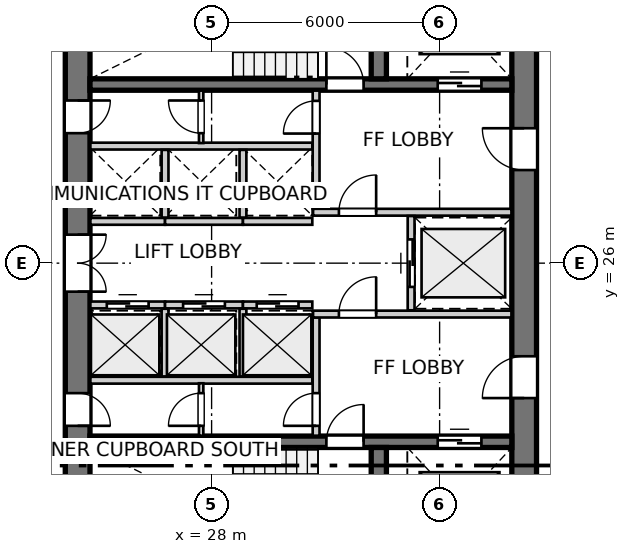
"""IFC4 building model, lengths in metres.
Left out: names, types, materials, properties, quantities, classifications, styles, units other than length and angle.
Written with IfcOpenShell. Run it as: python <this file> out.ifc"""

import sys

from ifc_helpers import new_model, si_unit, direction, frame, frame_2d, origin, place, context, subcontext, project, spatial, rectangle, extrude, source, transform, mapped, element, fill, save


model = new_model("IFC4")
c1 = context("Model", 3, precision=1e-05, world=origin(), true_north=direction((0.0, 1.0)))
c2 = subcontext(c1, "Body", "Model", "MODEL_VIEW")
j1 = project(units=[si_unit("LENGTHUNIT", "METRE"), si_unit("PLANEANGLEUNIT", "RADIAN")], contexts=[c1])
p1 = place(None, origin())
s1 = spatial("IfcSite", under=j1, at=p1, CompositionType="ELEMENT")
p2 = place(p1, origin())
s2 = spatial("IfcBuilding", under=s1, at=p2, CompositionType="ELEMENT")
p3 = place(p2, frame((0.0, 0.0, 115.2)))
s3 = spatial("IfcBuildingStorey", under=s2, at=p3, CompositionType="ELEMENT", Elevation=115.2)
p4 = place(p3, frame((24.475, 33.8, 0.0), z_axis=(0.0, 0.0, 1.0), x_axis=(0.0, -1.0, 0.0)))
e1 = element("IfcWall", 1, at=p4, inside=s3, PredefinedType="SHEAR", context=c2, shape_type="SweptSolid", body=[
    extrude(rectangle(XDim=15.6, YDim=0.65, at=frame_2d((7.8, 0.0))), origin(), (0.0, 0.0, 1.0), 2.95),
])
p5 = place(p4, frame((7.05, 0.0, 0.0)))
e2 = element("IfcOpeningElement", 2, at=p5, cuts=e1, PredefinedType="OPENING", context=c2, shape_type="SweptSolid", body=[
    extrude(rectangle(XDim=1.5, YDim=2.15, at=frame_2d((0.75, 1.075))), frame((0.0, 0.335, 0.0), z_axis=(0.0, -1.0, 0.0), x_axis=(1.0, 0.0, 0.0)), (0.0, 0.0, 1.0), 0.67),
])
p6 = place(p4, frame((3.52, 0.0, 0.0)))
e3 = element("IfcOpeningElement", 3, at=p6, cuts=e1, PredefinedType="OPENING", context=c2, shape_type="SweptSolid", body=[
    extrude(rectangle(XDim=0.86, YDim=2.05, at=frame_2d((0.43, 1.025))), frame((0.0, 0.335, 0.0), z_axis=(0.0, -1.0, 0.0), x_axis=(1.0, 0.0, 0.0)), (0.0, 0.0, 1.0), 0.67),
])
p7 = place(p4, frame((11.22, 0.0, 0.0)))
e4 = element("IfcOpeningElement", 4, at=p7, cuts=e1, PredefinedType="OPENING", context=c2, shape_type="SweptSolid", body=[
    extrude(rectangle(XDim=0.86, YDim=2.05, at=frame_2d((0.43, 1.025))), frame((0.0, 0.335, 0.0), z_axis=(0.0, -1.0, 0.0), x_axis=(1.0, 0.0, 0.0)), (0.0, 0.0, 1.0), 0.67),
])
p8 = place(p3, frame((36.225, 18.2, 0.0), z_axis=(0.0, 0.0, 1.0), x_axis=(0.0, 1.0, 0.0)))
e5 = element("IfcWall", 5, at=p8, inside=s3, PredefinedType="SHEAR", context=c2, shape_type="SweptSolid", body=[
    extrude(rectangle(XDim=15.6, YDim=0.65, at=frame_2d((7.8, 0.0))), origin(), (0.0, 0.0, 1.0), 2.95),
])
p9 = place(p8, frame((4.25, 0.0, 0.0)))
e6 = element("IfcOpeningElement", 6, at=p9, cuts=e5, PredefinedType="OPENING", context=c2, shape_type="SweptSolid", body=[
    extrude(rectangle(XDim=1.1, YDim=2.15, at=frame_2d((0.55, 1.075))), frame((0.0, 0.335, 0.0), z_axis=(0.0, -1.0, 0.0), x_axis=(1.0, 0.0, 0.0)), (0.0, 0.0, 1.0), 0.67),
])
p10 = place(p8, frame((10.25, 0.0, 0.0)))
e7 = element("IfcOpeningElement", 7, at=p10, cuts=e5, PredefinedType="OPENING", context=c2, shape_type="SweptSolid", body=[
    extrude(rectangle(XDim=1.1, YDim=2.15, at=frame_2d((0.55, 1.075))), frame((0.0, 0.335, 0.0), z_axis=(0.0, -1.0, 0.0), x_axis=(1.0, 0.0, 0.0)), (0.0, 0.0, 1.0), 0.67),
])
p11 = place(p3, frame((24.8, 21.3, 0.0), z_axis=(0.0, 0.0, 1.0), x_axis=(1.0, 0.0, 0.0)))
e8 = element("IfcWall", 8, at=p11, inside=s3, PredefinedType="SHEAR", context=c2, shape_type="SweptSolid", body=[
    extrude(rectangle(XDim=11.1, YDim=0.3, at=frame_2d((5.55, 0.0))), origin(), (0.0, 0.0, 1.0), 2.95),
])
p12 = place(p11, frame((6.22, 0.0, 0.0)))
e9 = element("IfcOpeningElement", 9, at=p12, cuts=e8, PredefinedType="OPENING", context=c2, shape_type="SweptSolid", body=[
    extrude(rectangle(XDim=0.98, YDim=2.15, at=frame_2d((0.49, 1.075))), frame((0.0, 0.16, 0.0), z_axis=(0.0, -1.0, 0.0), x_axis=(1.0, 0.0, 0.0)), (0.0, 0.0, 1.0), 0.32),
])
p13 = place(p11, frame((9.15, 0.0, 0.0)))
e10 = element("IfcOpeningElement", 10, at=p13, cuts=e8, PredefinedType="OPENING", context=c2, shape_type="SweptSolid", body=[
    extrude(rectangle(XDim=1.15, YDim=2.15, at=frame_2d((0.575, 1.075))), frame((0.0, 0.16, 0.0), z_axis=(0.0, -1.0, 0.0), x_axis=(1.0, 0.0, 0.0)), (0.0, 0.0, 1.0), 0.32),
])
p14 = place(p3, frame((32.4, 18.2, 0.0), z_axis=(0.0, 0.0, 1.0), x_axis=(0.0, 1.0, 0.0)))
e11 = element("IfcWall", 11, at=p14, inside=s3, PredefinedType="SHEAR", context=c2, shape_type="SweptSolid", body=[
    extrude(rectangle(XDim=2.95, YDim=0.4, at=frame_2d((1.475, 0.0))), origin(), (0.0, 0.0, 1.0), 2.95),
])
p15 = place(p3, frame((24.8, 30.7, 0.0), z_axis=(0.0, 0.0, 1.0), x_axis=(1.0, 0.0, 0.0)))
e12 = element("IfcWall", 12, at=p15, inside=s3, PredefinedType="SHEAR", context=c2, shape_type="SweptSolid", body=[
    extrude(rectangle(XDim=11.1, YDim=0.3, at=frame_2d((5.55, 0.0))), origin(), (0.0, 0.0, 1.0), 2.95),
])
p16 = place(p15, frame((6.22, 0.0, 0.0)))
e13 = element("IfcOpeningElement", 13, at=p16, cuts=e12, PredefinedType="OPENING", context=c2, shape_type="SweptSolid", body=[
    extrude(rectangle(XDim=0.98, YDim=2.15, at=frame_2d((0.49, 1.075))), frame((0.0, 0.16, 0.0), z_axis=(0.0, -1.0, 0.0), x_axis=(1.0, 0.0, 0.0)), (0.0, 0.0, 1.0), 0.32),
])
p17 = place(p15, frame((9.15, 0.0, 0.0)))
e14 = element("IfcOpeningElement", 14, at=p17, cuts=e12, PredefinedType="OPENING", context=c2, shape_type="SweptSolid", body=[
    extrude(rectangle(XDim=1.15, YDim=2.15, at=frame_2d((0.575, 1.075))), frame((0.0, 0.16, 0.0), z_axis=(0.0, -1.0, 0.0), x_axis=(1.0, 0.0, 0.0)), (0.0, 0.0, 1.0), 0.32),
])
p18 = place(p3, frame((32.4, 30.85, 0.0), z_axis=(0.0, 0.0, 1.0), x_axis=(0.0, 1.0, 0.0)))
e15 = element("IfcWall", 15, at=p18, inside=s3, PredefinedType="SHEAR", context=c2, shape_type="SweptSolid", body=[
    extrude(rectangle(XDim=2.95, YDim=0.4, at=frame_2d((1.475, 0.0))), origin(), (0.0, 0.0, 1.0), 2.95),
])
p19 = place(p3, frame((30.75, 21.46, 0.0), z_axis=(0.0, 0.0, 1.0), x_axis=(0.0, 1.0, 0.0)))
e16 = element("IfcWall", 16, at=p19, inside=s3, PredefinedType="PARTITIONING", context=c2, shape_type="SweptSolid", body=[
    extrude(rectangle(XDim=3.11, YDim=0.18, at=frame_2d((1.555, 0.0))), origin(), (0.0, 0.0, 1.0), 2.95),
])
p20 = place(p19, frame((0.26, 0.0, 0.0)))
e17 = element("IfcOpeningElement", 17, at=p20, cuts=e16, PredefinedType="OPENING", context=c2, shape_type="SweptSolid", body=[
    extrude(rectangle(XDim=0.86, YDim=2.05, at=frame_2d((0.43, 1.025))), frame((0.0, 0.1, 0.0), z_axis=(0.0, -1.0, 0.0), x_axis=(1.0, 0.0, 0.0)), (0.0, 0.0, 1.0), 0.2),
])
p21 = place(p3, frame((30.67, 24.66, 0.0), z_axis=(0.0, 0.0, 1.0), x_axis=(1.0, 0.0, 0.0)))
e18 = element("IfcWall", 18, at=p21, inside=s3, PredefinedType="PARTITIONING", context=c2, shape_type="SweptSolid", body=[
    extrude(rectangle(XDim=5.22, YDim=0.18, at=frame_2d((2.61, 0.0))), origin(), (0.0, 0.0, 1.0), 2.95),
])
p22 = place(p21, frame((0.68, 0.0, 0.0)))
e19 = element("IfcOpeningElement", 19, at=p22, cuts=e18, PredefinedType="OPENING", context=c2, shape_type="SweptSolid", body=[
    extrude(rectangle(XDim=0.98, YDim=2.15, at=frame_2d((0.49, 1.075))), frame((0.0, 0.1, 0.0), z_axis=(0.0, -1.0, 0.0), x_axis=(1.0, 0.0, 0.0)), (0.0, 0.0, 1.0), 0.2),
])
p23 = place(p3, frame((30.75, 27.43, 0.0), z_axis=(0.0, 0.0, 1.0), x_axis=(0.0, 1.0, 0.0)))
e20 = element("IfcWall", 20, at=p23, inside=s3, PredefinedType="PARTITIONING", context=c2, shape_type="SweptSolid", body=[
    extrude(rectangle(XDim=3.11, YDim=0.18, at=frame_2d((1.555, 0.0))), origin(), (0.0, 0.0, 1.0), 2.95),
])
p24 = place(p23, frame((1.98, 0.0, 0.0)))
e21 = element("IfcOpeningElement", 21, at=p24, cuts=e20, PredefinedType="OPENING", context=c2, shape_type="SweptSolid", body=[
    extrude(rectangle(XDim=0.86, YDim=2.05, at=frame_2d((0.43, 1.025))), frame((0.0, 0.1, 0.0), z_axis=(0.0, -1.0, 0.0), x_axis=(1.0, 0.0, 0.0)), (0.0, 0.0, 1.0), 0.2),
])
p25 = place(p3, frame((30.67, 27.34, 0.0), z_axis=(0.0, 0.0, 1.0), x_axis=(1.0, 0.0, 0.0)))
e22 = element("IfcWall", 22, at=p25, inside=s3, PredefinedType="PARTITIONING", context=c2, shape_type="SweptSolid", body=[
    extrude(rectangle(XDim=5.22, YDim=0.18, at=frame_2d((2.61, 0.0))), origin(), (0.0, 0.0, 1.0), 2.95),
])
p26 = place(p25, frame((0.68, 0.0, 0.0)))
e23 = element("IfcOpeningElement", 23, at=p26, cuts=e22, PredefinedType="OPENING", context=c2, shape_type="SweptSolid", body=[
    extrude(rectangle(XDim=0.98, YDim=2.15, at=frame_2d((0.49, 1.075))), frame((0.0, 0.1, 0.0), z_axis=(0.0, -1.0, 0.0), x_axis=(1.0, 0.0, 0.0)), (0.0, 0.0, 1.0), 0.2),
])
p27 = place(p3, frame((33.25, 24.76, 0.0), z_axis=(0.0, 0.0, 1.0), x_axis=(0.0, 1.0, 0.0)))
e24 = element("IfcWall", 24, at=p27, inside=s3, PredefinedType="PARTITIONING", context=c2, shape_type="SweptSolid", body=[
    extrude(rectangle(XDim=2.48, YDim=0.18, at=frame_2d((1.24, 0.0))), origin(), (0.0, 0.0, 1.0), 2.95),
])
p28 = place(p27, frame((0.615, 0.0, 0.0)))
e25 = element("IfcOpeningElement", 25, at=p28, cuts=e24, PredefinedType="OPENING", context=c2, shape_type="SweptSolid", body=[
    extrude(rectangle(XDim=1.25, YDim=2.15, at=frame_2d((0.625, 1.075))), frame((0.0, 0.1, 0.0), z_axis=(0.0, -1.0, 0.0), x_axis=(1.0, 0.0, 0.0)), (0.0, 0.0, 1.0), 0.2),
])
p29 = place(p3, frame((24.81, 22.92, 0.0), z_axis=(0.0, 0.0, 1.0), x_axis=(1.0, 0.0, 0.0)))
e26 = element("IfcWall", 26, at=p29, inside=s3, PredefinedType="PARTITIONING", context=c2, shape_type="SweptSolid", body=[
    extrude(rectangle(XDim=5.84, YDim=0.18, at=frame_2d((2.92, 0.0))), origin(), (0.0, 0.0, 1.0), 2.95),
])
p30 = place(p3, frame((24.81, 24.9, 0.0), z_axis=(0.0, 0.0, 1.0), x_axis=(1.0, 0.0, 0.0)))
e27 = element("IfcWall", 27, at=p30, inside=s3, PredefinedType="PARTITIONING", context=c2, shape_type="SweptSolid", body=[
    extrude(rectangle(XDim=1.965, YDim=0.18, at=frame_2d((0.982, 0.0))), origin(), (0.0, 0.0, 1.0), 2.95),
])
p31 = place(p30, frame((0.433, 0.0, 0.0)))
e28 = element("IfcOpeningElement", 28, at=p31, cuts=e27, PredefinedType="OPENING", context=c2, shape_type="SweptSolid", body=[
    extrude(rectangle(XDim=1.1, YDim=2.15, at=frame_2d((0.55, 1.075))), frame((0.0, 0.1, 0.0), z_axis=(0.0, -1.0, 0.0), x_axis=(1.0, 0.0, 0.0)), (0.0, 0.0, 1.0), 0.2),
])
p32 = place(p3, frame((26.775, 24.9, 0.0), z_axis=(0.0, 0.0, 1.0), x_axis=(1.0, 0.0, 0.0)))
e29 = element("IfcWall", 29, at=p32, inside=s3, PredefinedType="PARTITIONING", context=c2, shape_type="SweptSolid", body=[
    extrude(rectangle(XDim=2.05, YDim=0.18, at=frame_2d((1.025, 0.0))), origin(), (0.0, 0.0, 1.0), 2.95),
])
p33 = place(p32, frame((0.475, 0.0, 0.0)))
e30 = element("IfcOpeningElement", 30, at=p33, cuts=e29, PredefinedType="OPENING", context=c2, shape_type="SweptSolid", body=[
    extrude(rectangle(XDim=1.1, YDim=2.15, at=frame_2d((0.55, 1.075))), frame((0.0, 0.1, 0.0), z_axis=(0.0, -1.0, 0.0), x_axis=(1.0, 0.0, 0.0)), (0.0, 0.0, 1.0), 0.2),
])
p34 = place(p3, frame((26.775, 23.02, 0.0), z_axis=(0.0, 0.0, 1.0), x_axis=(0.0, 1.0, 0.0)))
e31 = element("IfcWall", 31, at=p34, inside=s3, PredefinedType="PARTITIONING", context=c2, shape_type="SweptSolid", body=[
    extrude(rectangle(XDim=1.78, YDim=0.18, at=frame_2d((0.89, 0.0))), origin(), (0.0, 0.0, 1.0), 2.95),
])
p35 = place(p3, frame((28.825, 24.9, 0.0), z_axis=(0.0, 0.0, 1.0), x_axis=(1.0, 0.0, 0.0)))
e32 = element("IfcWall", 32, at=p35, inside=s3, PredefinedType="PARTITIONING", context=c2, shape_type="SweptSolid", body=[
    extrude(rectangle(XDim=1.825, YDim=0.18, at=frame_2d((0.913, 0.0))), origin(), (0.0, 0.0, 1.0), 2.95),
])
p36 = place(p35, frame((0.363, 0.0, 0.0)))
e33 = element("IfcOpeningElement", 33, at=p36, cuts=e32, PredefinedType="OPENING", context=c2, shape_type="SweptSolid", body=[
    extrude(rectangle(XDim=1.1, YDim=2.15, at=frame_2d((0.55, 1.075))), frame((0.0, 0.1, 0.0), z_axis=(0.0, -1.0, 0.0), x_axis=(1.0, 0.0, 0.0)), (0.0, 0.0, 1.0), 0.2),
])
p37 = place(p3, frame((28.825, 23.02, 0.0), z_axis=(0.0, 0.0, 1.0), x_axis=(0.0, 1.0, 0.0)))
e34 = element("IfcWall", 34, at=p37, inside=s3, PredefinedType="PARTITIONING", context=c2, shape_type="SweptSolid", body=[
    extrude(rectangle(XDim=1.78, YDim=0.18, at=frame_2d((0.89, 0.0))), origin(), (0.0, 0.0, 1.0), 2.95),
])
p38 = place(p3, frame((24.81, 29.08, 0.0), z_axis=(0.0, 0.0, 1.0), x_axis=(1.0, 0.0, 0.0)))
e35 = element("IfcWall", 35, at=p38, inside=s3, PredefinedType="PARTITIONING", context=c2, shape_type="SweptSolid", body=[
    extrude(rectangle(XDim=5.84, YDim=0.18, at=frame_2d((2.92, 0.0))), origin(), (0.0, 0.0, 1.0), 2.95),
])
p39 = place(p3, frame((24.81, 27.1, 0.0), z_axis=(0.0, 0.0, 1.0), x_axis=(1.0, 0.0, 0.0)))
e36 = element("IfcWall", 36, at=p39, inside=s3, PredefinedType="PARTITIONING", context=c2, shape_type="SweptSolid", body=[
    extrude(rectangle(XDim=1.965, YDim=0.18, at=frame_2d((0.982, 0.0))), origin(), (0.0, 0.0, 1.0), 2.95),
])
p40 = place(p3, frame((26.775, 27.1, 0.0), z_axis=(0.0, 0.0, 1.0), x_axis=(1.0, 0.0, 0.0)))
e37 = element("IfcWall", 37, at=p40, inside=s3, PredefinedType="PARTITIONING", context=c2, shape_type="SweptSolid", body=[
    extrude(rectangle(XDim=2.05, YDim=0.18, at=frame_2d((1.025, 0.0))), origin(), (0.0, 0.0, 1.0), 2.95),
])
p41 = place(p3, frame((26.775, 27.2, 0.0), z_axis=(0.0, 0.0, 1.0), x_axis=(0.0, 1.0, 0.0)))
e38 = element("IfcWall", 38, at=p41, inside=s3, PredefinedType="PARTITIONING", context=c2, shape_type="SweptSolid", body=[
    extrude(rectangle(XDim=1.78, YDim=0.18, at=frame_2d((0.89, 0.0))), origin(), (0.0, 0.0, 1.0), 2.95),
])
p42 = place(p3, frame((28.825, 27.1, 0.0), z_axis=(0.0, 0.0, 1.0), x_axis=(1.0, 0.0, 0.0)))
e39 = element("IfcWall", 39, at=p42, inside=s3, PredefinedType="PARTITIONING", context=c2, shape_type="SweptSolid", body=[
    extrude(rectangle(XDim=1.825, YDim=0.18, at=frame_2d((0.913, 0.0))), origin(), (0.0, 0.0, 1.0), 2.95),
])
p43 = place(p3, frame((28.825, 27.2, 0.0), z_axis=(0.0, 0.0, 1.0), x_axis=(0.0, 1.0, 0.0)))
e40 = element("IfcWall", 40, at=p43, inside=s3, PredefinedType="PARTITIONING", context=c2, shape_type="SweptSolid", body=[
    extrude(rectangle(XDim=1.78, YDim=0.18, at=frame_2d((0.89, 0.0))), origin(), (0.0, 0.0, 1.0), 2.95),
])
p44 = place(p3, frame((27.725, 21.46, 0.0), z_axis=(0.0, 0.0, 1.0), x_axis=(0.0, 1.0, 0.0)))
e41 = element("IfcWall", 41, at=p44, inside=s3, PredefinedType="PARTITIONING", context=c2, shape_type="SweptSolid", body=[
    extrude(rectangle(XDim=1.38, YDim=0.115, at=frame_2d((0.69, 0.0))), origin(), (0.0, 0.0, 1.0), 2.95),
])
p45 = place(p44, frame((0.26, 0.0, 0.0)))
e42 = element("IfcOpeningElement", 42, at=p45, cuts=e41, PredefinedType="OPENING", context=c2, shape_type="SweptSolid", body=[
    extrude(rectangle(XDim=0.86, YDim=2.05, at=frame_2d((0.43, 1.025))), frame((0.0, 0.067, 0.0), z_axis=(0.0, -1.0, 0.0), x_axis=(1.0, 0.0, 0.0)), (0.0, 0.0, 1.0), 0.135),
])
p46 = place(p3, frame((27.725, 29.16, 0.0), z_axis=(0.0, 0.0, 1.0), x_axis=(0.0, 1.0, 0.0)))
e43 = element("IfcWall", 43, at=p46, inside=s3, PredefinedType="PARTITIONING", context=c2, shape_type="SweptSolid", body=[
    extrude(rectangle(XDim=1.38, YDim=0.115, at=frame_2d((0.69, 0.0))), origin(), (0.0, 0.0, 1.0), 2.95),
])
p47 = place(p46, frame((0.26, 0.0, 0.0)))
e44 = element("IfcOpeningElement", 44, at=p47, cuts=e43, PredefinedType="OPENING", context=c2, shape_type="SweptSolid", body=[
    extrude(rectangle(XDim=0.86, YDim=2.05, at=frame_2d((0.43, 1.025))), frame((0.0, 0.067, 0.0), z_axis=(0.0, -1.0, 0.0), x_axis=(1.0, 0.0, 0.0)), (0.0, 0.0, 1.0), 0.135),
])
m1 = source(origin(), c2, "Body", "SweptSolid", [
    extrude(rectangle(XDim=0.98, YDim=2.15, at=frame_2d((0.49, 1.075))), frame((0.0, 0.025, 0.0), z_axis=(0.0, -1.0, 0.0), x_axis=(1.0, 0.0, 0.0)), (0.0, 0.0, 1.0), 0.05),
])
p48 = place(p12, origin())
e45 = element("IfcDoor", 45, at=p48, inside=s3, OperationType="SINGLE_SWING_RIGHT", PredefinedType="DOOR", context=c2, shape_type="MappedRepresentation", body=[
    mapped(m1, transform((0.0, 0.0, 0.0), x_axis=(1.0, 0.0, 0.0), y_axis=(0.0, 1.0, 0.0), z_axis=(0.0, 0.0, 1.0), scale=1.0)),
])
fill(e9, e45)
m2 = source(origin(), c2, "Body", "SweptSolid", [
    extrude(rectangle(XDim=1.15, YDim=2.15, at=frame_2d((0.575, 1.075))), frame((0.0, 0.025, 0.0), z_axis=(0.0, -1.0, 0.0), x_axis=(1.0, 0.0, 0.0)), (0.0, 0.0, 1.0), 0.05),
])
p49 = place(p13, origin())
e46 = element("IfcDoor", 46, at=p49, inside=s3, OperationType="DOUBLE_DOOR_SLIDING", PredefinedType="DOOR", context=c2, shape_type="MappedRepresentation", body=[
    mapped(m2, transform((0.0, 0.0, 0.0), x_axis=(1.0, 0.0, 0.0), y_axis=(0.0, 1.0, 0.0), z_axis=(0.0, 0.0, 1.0), scale=1.0)),
])
fill(e10, e46)
p50 = place(p16, origin())
e47 = element("IfcDoor", 47, at=p50, inside=s3, OperationType="SINGLE_SWING_LEFT", PredefinedType="DOOR", context=c2, shape_type="MappedRepresentation", body=[
    mapped(m1, transform((0.0, 0.0, 0.0), x_axis=(1.0, 0.0, 0.0), y_axis=(0.0, 1.0, 0.0), z_axis=(0.0, 0.0, 1.0), scale=1.0)),
])
fill(e13, e47)
p51 = place(p17, origin())
e48 = element("IfcDoor", 48, at=p51, inside=s3, OperationType="DOUBLE_DOOR_SLIDING", PredefinedType="DOOR", context=c2, shape_type="MappedRepresentation", body=[
    mapped(m2, transform((0.0, 0.0, 0.0), x_axis=(1.0, 0.0, 0.0), y_axis=(0.0, 1.0, 0.0), z_axis=(0.0, 0.0, 1.0), scale=1.0)),
])
fill(e14, e48)
m3 = source(origin(), c2, "Body", "SweptSolid", [
    extrude(rectangle(XDim=1.1, YDim=2.15, at=frame_2d((0.55, 1.075))), frame((0.0, 0.025, 0.0), z_axis=(0.0, -1.0, 0.0), x_axis=(1.0, 0.0, 0.0)), (0.0, 0.0, 1.0), 0.05),
])
p52 = place(p9, origin())
e49 = element("IfcDoor", 49, at=p52, inside=s3, OperationType="SINGLE_SWING_LEFT", PredefinedType="DOOR", context=c2, shape_type="MappedRepresentation", body=[
    mapped(m3, transform((0.0, 0.0, 0.0), x_axis=(1.0, 0.0, 0.0), y_axis=(0.0, 1.0, 0.0), z_axis=(0.0, 0.0, 1.0), scale=1.0)),
])
fill(e6, e49)
p53 = place(p10, origin())
e50 = element("IfcDoor", 50, at=p53, inside=s3, OperationType="SINGLE_SWING_RIGHT", PredefinedType="DOOR", context=c2, shape_type="MappedRepresentation", body=[
    mapped(m3, transform((0.0, 0.0, 0.0), x_axis=(1.0, 0.0, 0.0), y_axis=(0.0, 1.0, 0.0), z_axis=(0.0, 0.0, 1.0), scale=1.0)),
])
fill(e7, e50)
m4 = source(origin(), c2, "Body", "SweptSolid", [
    extrude(rectangle(XDim=1.5, YDim=2.15, at=frame_2d((0.75, 1.075))), frame((0.0, 0.025, 0.0), z_axis=(0.0, -1.0, 0.0), x_axis=(1.0, 0.0, 0.0)), (0.0, 0.0, 1.0), 0.05),
])
p54 = place(p5, origin())
e51 = element("IfcDoor", 51, at=p54, inside=s3, OperationType="DOUBLE_DOOR_SINGLE_SWING", PredefinedType="DOOR", context=c2, shape_type="MappedRepresentation", body=[
    mapped(m4, transform((0.0, 0.0, 0.0), x_axis=(1.0, 0.0, 0.0), y_axis=(0.0, 1.0, 0.0), z_axis=(0.0, 0.0, 1.0), scale=1.0)),
])
fill(e2, e51)
m5 = source(origin(), c2, "Body", "SweptSolid", [
    extrude(rectangle(XDim=0.86, YDim=2.05, at=frame_2d((0.43, 1.025))), frame((0.0, 0.025, 0.0), z_axis=(0.0, -1.0, 0.0), x_axis=(1.0, 0.0, 0.0)), (0.0, 0.0, 1.0), 0.05),
])
p55 = place(p6, origin())
e52 = element("IfcDoor", 52, at=p55, inside=s3, OperationType="SINGLE_SWING_LEFT", PredefinedType="DOOR", context=c2, shape_type="MappedRepresentation", body=[
    mapped(m5, transform((0.0, 0.0, 0.0), x_axis=(1.0, 0.0, 0.0), y_axis=(0.0, 1.0, 0.0), z_axis=(0.0, 0.0, 1.0), scale=1.0)),
])
fill(e3, e52)
p56 = place(p7, origin())
e53 = element("IfcDoor", 53, at=p56, inside=s3, OperationType="SINGLE_SWING_RIGHT", PredefinedType="DOOR", context=c2, shape_type="MappedRepresentation", body=[
    mapped(m5, transform((0.0, 0.0, 0.0), x_axis=(1.0, 0.0, 0.0), y_axis=(0.0, 1.0, 0.0), z_axis=(0.0, 0.0, 1.0), scale=1.0)),
])
fill(e4, e53)
p57 = place(p20, origin())
e54 = element("IfcDoor", 54, at=p57, inside=s3, OperationType="SINGLE_SWING_LEFT", PredefinedType="DOOR", context=c2, shape_type="MappedRepresentation", body=[
    mapped(m5, transform((0.0, 0.0, 0.0), x_axis=(1.0, 0.0, 0.0), y_axis=(0.0, 1.0, 0.0), z_axis=(0.0, 0.0, 1.0), scale=1.0)),
])
fill(e17, e54)
p58 = place(p22, origin())
e55 = element("IfcDoor", 55, at=p58, inside=s3, OperationType="SINGLE_SWING_RIGHT", PredefinedType="DOOR", context=c2, shape_type="MappedRepresentation", body=[
    mapped(m1, transform((0.0, 0.0, 0.0), x_axis=(1.0, 0.0, 0.0), y_axis=(0.0, 1.0, 0.0), z_axis=(0.0, 0.0, 1.0), scale=1.0)),
])
fill(e19, e55)
p59 = place(p24, origin())
e56 = element("IfcDoor", 56, at=p59, inside=s3, OperationType="SINGLE_SWING_LEFT", PredefinedType="DOOR", context=c2, shape_type="MappedRepresentation", body=[
    mapped(m5, transform((0.0, 0.0, 0.0), x_axis=(1.0, 0.0, 0.0), y_axis=(0.0, 1.0, 0.0), z_axis=(0.0, 0.0, 1.0), scale=1.0)),
])
fill(e21, e56)
p60 = place(p26, origin())
e57 = element("IfcDoor", 57, at=p60, inside=s3, OperationType="SINGLE_SWING_RIGHT", PredefinedType="DOOR", context=c2, shape_type="MappedRepresentation", body=[
    mapped(m1, transform((0.0, 0.0, 0.0), x_axis=(1.0, 0.0, 0.0), y_axis=(0.0, 1.0, 0.0), z_axis=(0.0, 0.0, 1.0), scale=1.0)),
])
fill(e23, e57)
m6 = source(origin(), c2, "Body", "SweptSolid", [
    extrude(rectangle(XDim=1.25, YDim=2.15, at=frame_2d((0.625, 1.075))), frame((0.0, 0.025, 0.0), z_axis=(0.0, -1.0, 0.0), x_axis=(1.0, 0.0, 0.0)), (0.0, 0.0, 1.0), 0.05),
])
p61 = place(p28, origin())
e58 = element("IfcDoor", 58, at=p61, inside=s3, OperationType="DOUBLE_DOOR_SLIDING", PredefinedType="DOOR", context=c2, shape_type="MappedRepresentation", body=[
    mapped(m6, transform((0.0, 0.0, 0.0), x_axis=(1.0, 0.0, 0.0), y_axis=(0.0, 1.0, 0.0), z_axis=(0.0, 0.0, 1.0), scale=1.0)),
])
fill(e25, e58)
p62 = place(p31, origin())
e59 = element("IfcDoor", 59, at=p62, inside=s3, OperationType="DOUBLE_DOOR_SLIDING", PredefinedType="DOOR", context=c2, shape_type="MappedRepresentation", body=[
    mapped(m3, transform((0.0, 0.0, 0.0), x_axis=(1.0, 0.0, 0.0), y_axis=(0.0, 1.0, 0.0), z_axis=(0.0, 0.0, 1.0), scale=1.0)),
])
fill(e28, e59)
p63 = place(p33, origin())
e60 = element("IfcDoor", 60, at=p63, inside=s3, OperationType="DOUBLE_DOOR_SLIDING", PredefinedType="DOOR", context=c2, shape_type="MappedRepresentation", body=[
    mapped(m3, transform((0.0, 0.0, 0.0), x_axis=(1.0, 0.0, 0.0), y_axis=(0.0, 1.0, 0.0), z_axis=(0.0, 0.0, 1.0), scale=1.0)),
])
fill(e30, e60)
p64 = place(p36, origin())
e61 = element("IfcDoor", 61, at=p64, inside=s3, OperationType="DOUBLE_DOOR_SLIDING", PredefinedType="DOOR", context=c2, shape_type="MappedRepresentation", body=[
    mapped(m3, transform((0.0, 0.0, 0.0), x_axis=(1.0, 0.0, 0.0), y_axis=(0.0, 1.0, 0.0), z_axis=(0.0, 0.0, 1.0), scale=1.0)),
])
fill(e33, e61)
p65 = place(p45, origin())
e62 = element("IfcDoor", 62, at=p65, inside=s3, OperationType="SINGLE_SWING_LEFT", PredefinedType="DOOR", context=c2, shape_type="MappedRepresentation", body=[
    mapped(m5, transform((0.0, 0.0, 0.0), x_axis=(1.0, 0.0, 0.0), y_axis=(0.0, 1.0, 0.0), z_axis=(0.0, 0.0, 1.0), scale=1.0)),
])
fill(e42, e62)
p66 = place(p47, origin())
e63 = element("IfcDoor", 63, at=p66, inside=s3, OperationType="SINGLE_SWING_RIGHT", PredefinedType="DOOR", context=c2, shape_type="MappedRepresentation", body=[
    mapped(m5, transform((0.0, 0.0, 0.0), x_axis=(1.0, 0.0, 0.0), y_axis=(0.0, 1.0, 0.0), z_axis=(0.0, 0.0, 1.0), scale=1.0)),
])
fill(e44, e63)
save(model, sys.argv[1])
